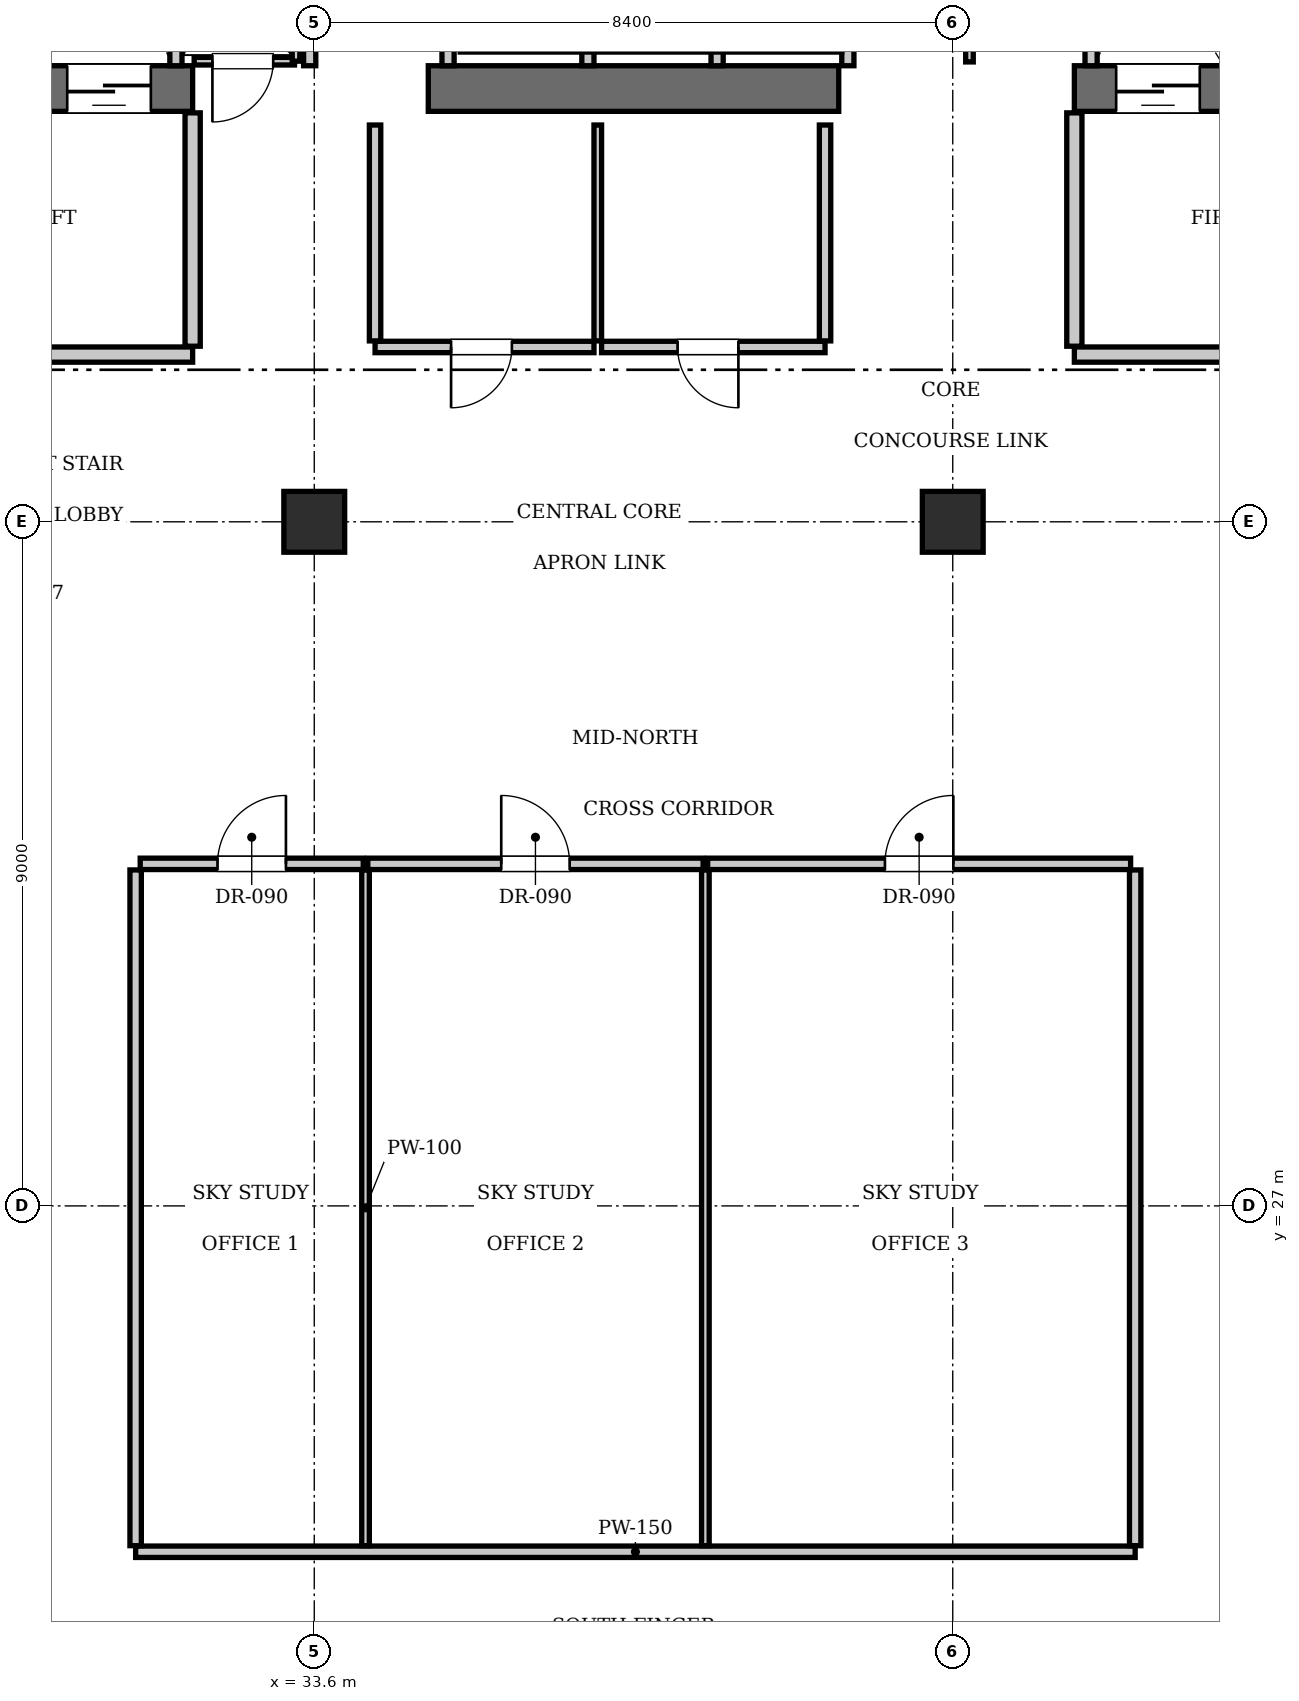
"""IFC4 building model, lengths in metres.
Left out: names, types, materials, properties, quantities, classifications, styles, units other than length and angle.
Written with IfcOpenShell. Run it as: python <this file> out.ifc"""

import sys

from ifc_helpers import new_model, si_unit, direction, frame, frame_2d, origin, origin_2d, place, context, subcontext, project, spatial, rectangle, extrude, element, fill, save


model = new_model("IFC4")
c1 = context("Model", 3, precision=1e-05, world=origin(), true_north=direction((0.0, 1.0)))
c2 = subcontext(c1, "Body", "Model", "MODEL_VIEW")
j1 = project(units=[si_unit("LENGTHUNIT", "METRE"), si_unit("PLANEANGLEUNIT", "RADIAN")], contexts=[c1])
p1 = place(None, origin())
s1 = spatial("IfcSite", under=j1, at=p1, CompositionType="ELEMENT")
p2 = place(p1, origin())
s2 = spatial("IfcBuilding", under=s1, at=p2, CompositionType="ELEMENT")
p3 = place(p2, frame((0.0, 0.0, 254.8)))
s3 = spatial("IfcBuildingStorey", under=s2, at=p3, CompositionType="ELEMENT", Elevation=254.8)
p4 = place(p3, frame((25.2, 41.7, 0.0), z_axis=(0.0, 0.0, 1.0), x_axis=(1.0, 0.0, 0.0)))
e1 = element("IfcWall", 1, at=p4, inside=s3, PredefinedType="SHEAR", context=c2, shape_type="SweptSolid", body=[
    extrude(rectangle(XDim=6.8, YDim=0.6, at=frame_2d((3.4, 0.0))), origin(), (0.0, 0.0, 1.0), 3.85),
])
p5 = place(p4, frame((1.65, 0.0, 0.0)))
e2 = element("IfcOpeningElement", 2, at=p5, cuts=e1, PredefinedType="OPENING", context=c2, shape_type="SweptSolid", body=[
    extrude(rectangle(XDim=1.15, YDim=2.15, at=frame_2d((0.575, 1.075))), frame((0.0, 0.31, 0.0), z_axis=(0.0, -1.0, 0.0), x_axis=(1.0, 0.0, 0.0)), (0.0, 0.0, 1.0), 0.62),
])
p6 = place(p4, frame((5.15, 0.0, 0.0)))
e3 = element("IfcOpeningElement", 3, at=p6, cuts=e1, PredefinedType="OPENING", context=c2, shape_type="SweptSolid", body=[
    extrude(rectangle(XDim=1.1, YDim=2.2, at=frame_2d((0.55, 1.1))), frame((0.0, 0.31, 0.0), z_axis=(0.0, -1.0, 0.0), x_axis=(1.0, 0.0, 0.0)), (0.0, 0.0, 1.0), 0.62),
])
p7 = place(p3, frame((35.1, 41.7, 0.0), z_axis=(0.0, 0.0, 1.0), x_axis=(1.0, 0.0, 0.0)))
e4 = element("IfcWall", 4, at=p7, inside=s3, PredefinedType="SHEAR", context=c2, shape_type="SweptSolid", body=[
    extrude(rectangle(XDim=5.4, YDim=0.6, at=frame_2d((2.7, 0.0))), origin(), (0.0, 0.0, 1.0), 3.85),
])
p8 = place(p3, frame((43.6, 41.7, 0.0), z_axis=(0.0, 0.0, 1.0), x_axis=(1.0, 0.0, 0.0)))
e5 = element("IfcWall", 5, at=p8, inside=s3, PredefinedType="SHEAR", context=c2, shape_type="SweptSolid", body=[
    extrude(rectangle(XDim=6.8, YDim=0.6, at=frame_2d((3.4, 0.0))), origin(), (0.0, 0.0, 1.0), 3.85),
])
p9 = place(p8, frame((3.9, 0.0, 0.0)))
e6 = element("IfcOpeningElement", 6, at=p9, cuts=e5, PredefinedType="OPENING", context=c2, shape_type="SweptSolid", body=[
    extrude(rectangle(XDim=1.15, YDim=2.15, at=frame_2d((0.575, 1.075))), frame((0.0, 0.31, 0.0), z_axis=(0.0, -1.0, 0.0), x_axis=(1.0, 0.0, 0.0)), (0.0, 0.0, 1.0), 0.62),
])
p10 = place(p8, frame((0.55, 0.0, 0.0)))
e7 = element("IfcOpeningElement", 7, at=p10, cuts=e5, PredefinedType="OPENING", context=c2, shape_type="SweptSolid", body=[
    extrude(rectangle(XDim=1.1, YDim=2.2, at=frame_2d((0.55, 1.1))), frame((0.0, 0.31, 0.0), z_axis=(0.0, -1.0, 0.0), x_axis=(1.0, 0.0, 0.0)), (0.0, 0.0, 1.0), 0.62),
])
for number, where, z_axis, x_axis in (
    (8, (33.6, 36.0, 0.0), (0.0, 0.0, 1.0), (1.0, 0.0, 0.0)),
    (9, (42.0, 36.0, 0.0), (0.0, 0.0, 1.0), (1.0, 0.0, 0.0)),
):
    element("IfcColumn", number, at=place(p3, frame(where, z_axis=z_axis, x_axis=x_axis)), inside=s3, PredefinedType="COLUMN", context=c2, shape_type="SweptSolid", body=[
        extrude(rectangle(XDim=0.8, YDim=0.8, at=origin_2d()), origin(), (0.0, 0.0, 1.0), 3.85),
    ])
for number, where, z_axis, x_axis in (
    (10, (31.78, 42.0, 0.0), (0.0, 0.0, 1.0), (0.0, 1.0, 0.0)),
    (11, (43.82, 42.0, 0.0), (0.0, 0.0, 1.0), (0.0, 1.0, 0.0)),
):
    element("IfcWall", number, at=place(p3, frame(where, z_axis=z_axis, x_axis=x_axis)), inside=s3, PredefinedType="SOLIDWALL", context=c2, shape_type="SweptSolid", body=[
        extrude(rectangle(XDim=2.74, YDim=0.16, at=frame_2d((1.37, 0.0))), origin(), (0.0, 0.0, 1.0), 3.61),
    ])
for number, where, z_axis, x_axis in (
    (12, (37.2, 42.0, 0.0), (0.0, 0.0, 1.0), (0.0, 1.0, 0.0)),
    (13, (38.9, 42.0, 0.0), (0.0, 0.0, 1.0), (0.0, 1.0, 0.0)),
    (14, (40.62, 42.0, 0.0), (0.0, 0.0, 1.0), (0.0, 1.0, 0.0)),
):
    element("IfcWall", number, at=place(p3, frame(where, z_axis=z_axis, x_axis=x_axis)), inside=s3, PredefinedType="SOLIDWALL", context=c2, shape_type="SweptSolid", body=[
        extrude(rectangle(XDim=2.35, YDim=0.16, at=frame_2d((1.175, 0.0))), origin(), (0.0, 0.0, 1.0), 3.61),
    ])
for number, where, z_axis, x_axis in (
    (15, (33.54, 42.0, 0.0), (0.0, 0.0, 1.0), (0.0, 1.0, 0.0)),
    (16, (35.36, 42.0, 0.0), (0.0, 0.0, 1.0), (0.0, 1.0, 0.0)),
):
    element("IfcWall", number, at=place(p3, frame(where, z_axis=z_axis, x_axis=x_axis)), inside=s3, PredefinedType="SOLIDWALL", context=c2, shape_type="SweptSolid", body=[
        extrude(rectangle(XDim=2.4, YDim=0.16, at=frame_2d((1.2, 0.0))), origin(), (0.0, 0.0, 1.0), 3.61),
    ])
p11 = place(p3, frame((26.2, 38.2, 0.0), z_axis=(0.0, 0.0, 1.0), x_axis=(1.0, 0.0, 0.0)))
e17 = element("IfcWall", 17, at=p11, inside=s3, PredefinedType="PARTITIONING", context=c2, shape_type="SweptSolid", body=[
    extrude(rectangle(XDim=5.8, YDim=0.2, at=frame_2d((2.9, 0.0))), origin(), (0.0, 0.0, 1.0), 3.61),
])
p12 = place(p11, frame((2.3, 0.0, 0.0)))
e18 = element("IfcOpeningElement", 18, at=p12, cuts=e17, PredefinedType="OPENING", context=c2, shape_type="SweptSolid", body=[
    extrude(rectangle(XDim=1.15, YDim=2.15, at=frame_2d((0.575, 1.075))), frame((0.0, 0.11, 0.0), z_axis=(0.0, -1.0, 0.0), x_axis=(1.0, 0.0, 0.0)), (0.0, 0.0, 1.0), 0.22),
])
p13 = place(p3, frame((32.0, 38.31, 0.0), z_axis=(0.0, 0.0, 1.0), x_axis=(0.0, 1.0, 0.0)))
e19 = element("IfcWall", 19, at=p13, inside=s3, PredefinedType="PARTITIONING", context=c2, shape_type="SweptSolid", body=[
    extrude(rectangle(XDim=3.07, YDim=0.2, at=frame_2d((1.535, 0.0))), origin(), (0.0, 0.0, 1.0), 3.61),
])
p14 = place(p3, frame((43.6, 38.2, 0.0), z_axis=(0.0, 0.0, 1.0), x_axis=(1.0, 0.0, 0.0)))
e20 = element("IfcWall", 20, at=p14, inside=s3, PredefinedType="PARTITIONING", context=c2, shape_type="SweptSolid", body=[
    extrude(rectangle(XDim=5.8, YDim=0.2, at=frame_2d((2.9, 0.0))), origin(), (0.0, 0.0, 1.0), 3.61),
])
p15 = place(p14, frame((2.3, 0.0, 0.0)))
e21 = element("IfcOpeningElement", 21, at=p15, cuts=e20, PredefinedType="OPENING", context=c2, shape_type="SweptSolid", body=[
    extrude(rectangle(XDim=1.15, YDim=2.15, at=frame_2d((0.575, 1.075))), frame((0.0, 0.11, 0.0), z_axis=(0.0, -1.0, 0.0), x_axis=(1.0, 0.0, 0.0)), (0.0, 0.0, 1.0), 0.22),
])
p16 = place(p3, frame((43.6, 38.31, 0.0), z_axis=(0.0, 0.0, 1.0), x_axis=(0.0, 1.0, 0.0)))
e22 = element("IfcWall", 22, at=p16, inside=s3, PredefinedType="PARTITIONING", context=c2, shape_type="SweptSolid", body=[
    extrude(rectangle(XDim=3.07, YDim=0.2, at=frame_2d((1.535, 0.0))), origin(), (0.0, 0.0, 1.0), 3.61),
])
p17 = place(p3, frame((32.02, 42.06, 0.0), z_axis=(0.0, 0.0, 1.0), x_axis=(1.0, 0.0, 0.0)))
e23 = element("IfcWall", 23, at=p17, inside=s3, PredefinedType="PARTITIONING", context=c2, shape_type="SweptSolid", body=[
    extrude(rectangle(XDim=1.32, YDim=0.1, at=frame_2d((0.66, 0.0))), origin(), (0.0, 0.0, 1.0), 3.61),
])
p18 = place(p17, frame((0.24, 0.0, 0.0)))
e24 = element("IfcOpeningElement", 24, at=p18, cuts=e23, PredefinedType="OPENING", context=c2, shape_type="SweptSolid", body=[
    extrude(rectangle(XDim=0.8, YDim=2.05, at=frame_2d((0.4, 1.025))), frame((0.0, 0.06, 0.0), z_axis=(0.0, -1.0, 0.0), x_axis=(1.0, 0.0, 0.0)), (0.0, 0.0, 1.0), 0.12),
])
p19 = place(p3, frame((33.36, 42.06, 0.0), z_axis=(0.0, 0.0, 1.0), x_axis=(0.0, 1.0, 0.0)))
e25 = element("IfcWall", 25, at=p19, inside=s3, PredefinedType="PARTITIONING", context=c2, shape_type="SweptSolid", body=[
    extrude(rectangle(XDim=2.88, YDim=0.1, at=frame_2d((1.44, 0.0))), origin(), (0.0, 0.0, 1.0), 3.61),
])
p20 = place(p3, frame((42.22, 42.05, 0.0), z_axis=(0.0, 0.0, 1.0), x_axis=(0.0, 1.0, 0.0)))
e26 = element("IfcWall", 26, at=p20, inside=s3, PredefinedType="PARTITIONING", context=c2, shape_type="SweptSolid", body=[
    extrude(rectangle(XDim=2.91, YDim=0.1, at=frame_2d((1.455, 0.0))), origin(), (0.0, 0.0, 1.0), 3.61),
])
p21 = place(p20, frame((0.65, 0.0, 0.0)))
e27 = element("IfcOpeningElement", 27, at=p21, cuts=e26, PredefinedType="OPENING", context=c2, shape_type="SweptSolid", body=[
    extrude(rectangle(XDim=0.8, YDim=2.05, at=frame_2d((0.4, 1.025))), frame((0.0, 0.06, 0.0), z_axis=(0.0, -1.0, 0.0), x_axis=(1.0, 0.0, 0.0)), (0.0, 0.0, 1.0), 0.12),
])
p22 = place(p3, frame((34.4, 38.3, 0.0), z_axis=(0.0, 0.0, 1.0), x_axis=(1.0, 0.0, 0.0)))
e28 = element("IfcWall", 28, at=p22, inside=s3, PredefinedType="PARTITIONING", context=c2, shape_type="SweptSolid", body=[
    extrude(rectangle(XDim=2.88, YDim=0.15, at=frame_2d((1.44, 0.0))), origin(), (0.0, 0.0, 1.0), 3.61),
])
p23 = place(p22, frame((1.0, 0.0, 0.0)))
e29 = element("IfcOpeningElement", 29, at=p23, cuts=e28, PredefinedType="OPENING", context=c2, shape_type="SweptSolid", body=[
    extrude(rectangle(XDim=0.8, YDim=2.05, at=frame_2d((0.4, 1.025))), frame((0.0, 0.085, 0.0), z_axis=(0.0, -1.0, 0.0), x_axis=(1.0, 0.0, 0.0)), (0.0, 0.0, 1.0), 0.17),
])
p24 = place(p3, frame((37.38, 38.3, 0.0), z_axis=(0.0, 0.0, 1.0), x_axis=(1.0, 0.0, 0.0)))
e30 = element("IfcWall", 30, at=p24, inside=s3, PredefinedType="PARTITIONING", context=c2, shape_type="SweptSolid", body=[
    extrude(rectangle(XDim=2.94, YDim=0.15, at=frame_2d((1.47, 0.0))), origin(), (0.0, 0.0, 1.0), 3.61),
])
p25 = place(p24, frame((1.0, 0.0, 0.0)))
e31 = element("IfcOpeningElement", 31, at=p25, cuts=e30, PredefinedType="OPENING", context=c2, shape_type="SweptSolid", body=[
    extrude(rectangle(XDim=0.8, YDim=2.05, at=frame_2d((0.4, 1.025))), frame((0.0, 0.085, 0.0), z_axis=(0.0, -1.0, 0.0), x_axis=(1.0, 0.0, 0.0)), (0.0, 0.0, 1.0), 0.17),
])
p26 = place(p3, frame((34.4, 38.38, 0.0), z_axis=(0.0, 0.0, 1.0), x_axis=(0.0, 1.0, 0.0)))
e32 = element("IfcWall", 32, at=p26, inside=s3, PredefinedType="PARTITIONING", context=c2, shape_type="SweptSolid", body=[
    extrude(rectangle(XDim=2.84, YDim=0.15, at=frame_2d((1.42, 0.0))), origin(), (0.0, 0.0, 1.0), 3.61),
])
p27 = place(p3, frame((37.33, 38.38, 0.0), z_axis=(0.0, 0.0, 1.0), x_axis=(0.0, 1.0, 0.0)))
e33 = element("IfcWall", 33, at=p27, inside=s3, PredefinedType="PARTITIONING", context=c2, shape_type="SweptSolid", body=[
    extrude(rectangle(XDim=2.84, YDim=0.1, at=frame_2d((1.42, 0.0))), origin(), (0.0, 0.0, 1.0), 3.61),
])
p28 = place(p3, frame((40.32, 38.38, 0.0), z_axis=(0.0, 0.0, 1.0), x_axis=(0.0, 1.0, 0.0)))
e34 = element("IfcWall", 34, at=p28, inside=s3, PredefinedType="PARTITIONING", context=c2, shape_type="SweptSolid", body=[
    extrude(rectangle(XDim=2.84, YDim=0.15, at=frame_2d((1.42, 0.0))), origin(), (0.0, 0.0, 1.0), 3.61),
])
p29 = place(p3, frame((31.25, 22.45, 0.0), z_axis=(0.0, 0.0, 1.0), x_axis=(1.0, 0.0, 0.0)))
e35 = element("IfcWall", 35, at=p29, inside=s3, PredefinedType="PARTITIONING", context=c2, shape_type="SweptSolid", body=[
    extrude(rectangle(XDim=13.15, YDim=0.15, at=frame_2d((6.575, 0.0))), origin(), (0.0, 0.0, 1.0), 3.61),
])
for number, where, z_axis, x_axis in (
    (36, (31.25, 22.53, 0.0), (0.0, 0.0, 1.0), (0.0, 1.0, 0.0)),
    (37, (44.4, 22.53, 0.0), (0.0, 0.0, 1.0), (0.0, 1.0, 0.0)),
):
    element("IfcWall", number, at=place(p3, frame(where, z_axis=z_axis, x_axis=x_axis)), inside=s3, PredefinedType="PARTITIONING", context=c2, shape_type="SweptSolid", body=[
        extrude(rectangle(XDim=8.89, YDim=0.15, at=frame_2d((4.445, 0.0))), origin(), (0.0, 0.0, 1.0), 3.61),
    ])
p30 = place(p3, frame((31.31, 31.5, 0.0), z_axis=(0.0, 0.0, 1.0), x_axis=(1.0, 0.0, 0.0)))
e38 = element("IfcWall", 38, at=p30, inside=s3, PredefinedType="PARTITIONING", context=c2, shape_type="SweptSolid", body=[
    extrude(rectangle(XDim=2.934, YDim=0.15, at=frame_2d((1.467, 0.0))), origin(), (0.0, 0.0, 1.0), 3.61),
])
p31 = place(p30, frame((1.017, 0.0, 0.0)))
e39 = element("IfcOpeningElement", 39, at=p31, cuts=e38, PredefinedType="OPENING", context=c2, shape_type="SweptSolid", body=[
    extrude(rectangle(XDim=0.9, YDim=2.1, at=frame_2d((0.45, 1.05))), frame((0.0, 0.085, 0.0), z_axis=(0.0, -1.0, 0.0), x_axis=(1.0, 0.0, 0.0)), (0.0, 0.0, 1.0), 0.17),
])
p32 = place(p3, frame((34.274, 22.53, 0.0), z_axis=(0.0, 0.0, 1.0), x_axis=(0.0, 1.0, 0.0)))
e40 = element("IfcWall", 40, at=p32, inside=s3, PredefinedType="PARTITIONING", context=c2, shape_type="SweptSolid", body=[
    extrude(rectangle(XDim=8.89, YDim=0.1, at=frame_2d((4.445, 0.0))), origin(), (0.0, 0.0, 1.0), 3.61),
])
p33 = place(p3, frame((34.304, 31.5, 0.0), z_axis=(0.0, 0.0, 1.0), x_axis=(1.0, 0.0, 0.0)))
e41 = element("IfcWall", 41, at=p33, inside=s3, PredefinedType="PARTITIONING", context=c2, shape_type="SweptSolid", body=[
    extrude(rectangle(XDim=4.411, YDim=0.15, at=frame_2d((2.206, 0.0))), origin(), (0.0, 0.0, 1.0), 3.61),
])
p34 = place(p33, frame((1.756, 0.0, 0.0)))
e42 = element("IfcOpeningElement", 42, at=p34, cuts=e41, PredefinedType="OPENING", context=c2, shape_type="SweptSolid", body=[
    extrude(rectangle(XDim=0.9, YDim=2.1, at=frame_2d((0.45, 1.05))), frame((0.0, 0.085, 0.0), z_axis=(0.0, -1.0, 0.0), x_axis=(1.0, 0.0, 0.0)), (0.0, 0.0, 1.0), 0.17),
])
p35 = place(p3, frame((38.746, 22.53, 0.0), z_axis=(0.0, 0.0, 1.0), x_axis=(0.0, 1.0, 0.0)))
e43 = element("IfcWall", 43, at=p35, inside=s3, PredefinedType="PARTITIONING", context=c2, shape_type="SweptSolid", body=[
    extrude(rectangle(XDim=8.89, YDim=0.1, at=frame_2d((4.445, 0.0))), origin(), (0.0, 0.0, 1.0), 3.61),
])
p36 = place(p3, frame((38.775, 31.5, 0.0), z_axis=(0.0, 0.0, 1.0), x_axis=(1.0, 0.0, 0.0)))
e44 = element("IfcWall", 44, at=p36, inside=s3, PredefinedType="PARTITIONING", context=c2, shape_type="SweptSolid", body=[
    extrude(rectangle(XDim=5.565, YDim=0.15, at=frame_2d((2.782, 0.0))), origin(), (0.0, 0.0, 1.0), 3.61),
])
p37 = place(p36, frame((2.332, 0.0, 0.0)))
e45 = element("IfcOpeningElement", 45, at=p37, cuts=e44, PredefinedType="OPENING", context=c2, shape_type="SweptSolid", body=[
    extrude(rectangle(XDim=0.9, YDim=2.1, at=frame_2d((0.45, 1.05))), frame((0.0, 0.085, 0.0), z_axis=(0.0, -1.0, 0.0), x_axis=(1.0, 0.0, 0.0)), (0.0, 0.0, 1.0), 0.17),
])
p38 = place(p6, frame((1.1, 0.0, 0.0), z_axis=(0.0, 0.0, 1.0), x_axis=(-1.0, 0.0, 0.0)))
e46 = element("IfcDoor", 46, at=p38, inside=s3, OperationType="SLIDING_TO_LEFT", PredefinedType="DOOR", context=c2, shape_type="SweptSolid", body=[
    extrude(rectangle(XDim=1.1, YDim=2.2, at=frame_2d((0.55, 1.1))), frame((0.0, 0.025, 0.0), z_axis=(0.0, -1.0, 0.0), x_axis=(1.0, 0.0, 0.0)), (0.0, 0.0, 1.0), 0.05),
])
fill(e3, e46)
p39 = place(p10, frame((1.1, 0.0, 0.0), z_axis=(0.0, 0.0, 1.0), x_axis=(-1.0, 0.0, 0.0)))
e47 = element("IfcDoor", 47, at=p39, inside=s3, OperationType="SLIDING_TO_LEFT", PredefinedType="DOOR", context=c2, shape_type="SweptSolid", body=[
    extrude(rectangle(XDim=1.1, YDim=2.2, at=frame_2d((0.55, 1.1))), frame((0.0, 0.025, 0.0), z_axis=(0.0, -1.0, 0.0), x_axis=(1.0, 0.0, 0.0)), (0.0, 0.0, 1.0), 0.05),
])
fill(e7, e47)
p40 = place(p18, frame((0.8, 0.0, 0.0), z_axis=(0.0, 0.0, 1.0), x_axis=(-1.0, 0.0, 0.0)))
e48 = element("IfcDoor", 48, at=p40, inside=s3, OperationType="SINGLE_SWING_RIGHT", PredefinedType="DOOR", context=c2, shape_type="SweptSolid", body=[
    extrude(rectangle(XDim=0.8, YDim=2.05, at=frame_2d((0.4, 1.025))), frame((0.0, 0.025, 0.0), z_axis=(0.0, -1.0, 0.0), x_axis=(1.0, 0.0, 0.0)), (0.0, 0.0, 1.0), 0.05),
])
fill(e24, e48)
p41 = place(p23, frame((0.8, 0.0, 0.0), z_axis=(0.0, 0.0, 1.0), x_axis=(-1.0, 0.0, 0.0)))
e49 = element("IfcDoor", 49, at=p41, inside=s3, OperationType="SINGLE_SWING_RIGHT", PredefinedType="DOOR", context=c2, shape_type="SweptSolid", body=[
    extrude(rectangle(XDim=0.8, YDim=2.05, at=frame_2d((0.4, 1.025))), frame((0.0, 0.025, 0.0), z_axis=(0.0, -1.0, 0.0), x_axis=(1.0, 0.0, 0.0)), (0.0, 0.0, 1.0), 0.05),
])
fill(e29, e49)
p42 = place(p25, frame((0.8, 0.0, 0.0), z_axis=(0.0, 0.0, 1.0), x_axis=(-1.0, 0.0, 0.0)))
e50 = element("IfcDoor", 50, at=p42, inside=s3, OperationType="SINGLE_SWING_LEFT", PredefinedType="DOOR", context=c2, shape_type="SweptSolid", body=[
    extrude(rectangle(XDim=0.8, YDim=2.05, at=frame_2d((0.4, 1.025))), frame((0.0, 0.025, 0.0), z_axis=(0.0, -1.0, 0.0), x_axis=(1.0, 0.0, 0.0)), (0.0, 0.0, 1.0), 0.05),
])
fill(e31, e50)
p43 = place(p31, origin())
e51 = element("IfcDoor", 51, at=p43, inside=s3, OperationType="SINGLE_SWING_RIGHT", PredefinedType="DOOR", context=c2, shape_type="SweptSolid", body=[
    extrude(rectangle(XDim=0.9, YDim=2.1, at=frame_2d((0.45, 1.05))), frame((0.0, 0.025, 0.0), z_axis=(0.0, -1.0, 0.0), x_axis=(1.0, 0.0, 0.0)), (0.0, 0.0, 1.0), 0.05),
])
fill(e39, e51)
p44 = place(p34, origin())
e52 = element("IfcDoor", 52, at=p44, inside=s3, OperationType="SINGLE_SWING_LEFT", PredefinedType="DOOR", context=c2, shape_type="SweptSolid", body=[
    extrude(rectangle(XDim=0.9, YDim=2.1, at=frame_2d((0.45, 1.05))), frame((0.0, 0.025, 0.0), z_axis=(0.0, -1.0, 0.0), x_axis=(1.0, 0.0, 0.0)), (0.0, 0.0, 1.0), 0.05),
])
fill(e42, e52)
p45 = place(p37, origin())
e53 = element("IfcDoor", 53, at=p45, inside=s3, OperationType="SINGLE_SWING_RIGHT", PredefinedType="DOOR", context=c2, shape_type="SweptSolid", body=[
    extrude(rectangle(XDim=0.9, YDim=2.1, at=frame_2d((0.45, 1.05))), frame((0.0, 0.025, 0.0), z_axis=(0.0, -1.0, 0.0), x_axis=(1.0, 0.0, 0.0)), (0.0, 0.0, 1.0), 0.05),
])
fill(e45, e53)
save(model, sys.argv[1])
